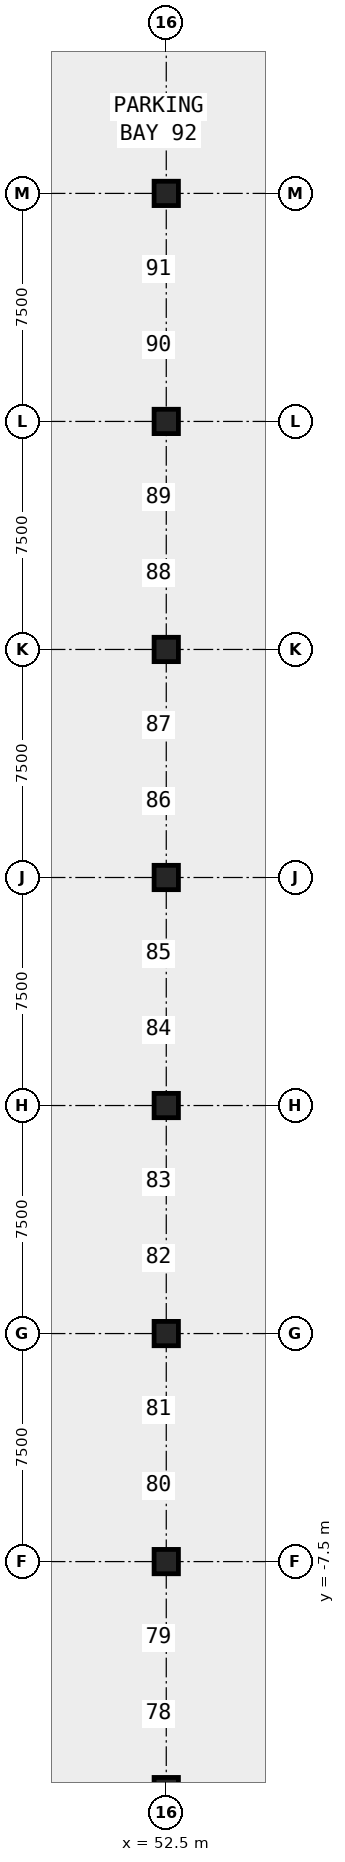
"""IFC4 building model, lengths in metres.
Left out: names, types, materials, properties, quantities, classifications, styles, units other than length and angle.
Written with IfcOpenShell. Run it as: python <this file> out.ifc"""

import sys

from ifc_helpers import new_model, si_unit, direction, frame, origin, origin_2d, place, context, subcontext, project, spatial, rectangle, extrude, element, save


model = new_model("IFC4")
c1 = context("Model", 3, precision=1e-05, world=origin(), true_north=direction((0.0, 1.0)))
c2 = subcontext(c1, "Body", "Model", "MODEL_VIEW")
j1 = project(units=[si_unit("LENGTHUNIT", "METRE"), si_unit("PLANEANGLEUNIT", "RADIAN")], contexts=[c1])
p1 = place(None, origin())
s1 = spatial("IfcSite", under=j1, at=p1, CompositionType="ELEMENT")
p2 = place(p1, origin())
s2 = spatial("IfcBuilding", under=s1, at=p2, CompositionType="ELEMENT")
p3 = place(p2, frame((0.0, 0.0, -5.5)))
s3 = spatial("IfcBuildingStorey", under=s2, at=p3, CompositionType="ELEMENT", Elevation=-5.5)
for number, where, z_axis, x_axis in (
    (1, (52.5, -15.0, -0.42), (0.0, 0.0, 1.0), (1.0, 0.0, 0.0)),
    (2, (52.5, -7.5, -0.42), (0.0, 0.0, 1.0), (1.0, 0.0, 0.0)),
    (3, (52.5, 0.0, -0.42), (0.0, 0.0, 1.0), (1.0, 0.0, 0.0)),
    (4, (52.5, 7.5, -0.42), (0.0, 0.0, 1.0), (1.0, 0.0, 0.0)),
    (5, (52.5, 15.0, -0.42), (0.0, 0.0, 1.0), (1.0, 0.0, 0.0)),
    (6, (52.5, 22.5, -0.42), (0.0, 0.0, 1.0), (1.0, 0.0, 0.0)),
    (7, (52.5, 30.0, -0.42), (0.0, 0.0, 1.0), (1.0, 0.0, 0.0)),
    (8, (52.5, 37.5, -0.42), (0.0, 0.0, 1.0), (1.0, 0.0, 0.0)),
):
    element("IfcColumn", number, at=place(p3, frame(where, z_axis=z_axis, x_axis=x_axis)), inside=s3, PredefinedType="COLUMN", context=c2, shape_type="SweptSolid", body=[
        extrude(rectangle(XDim=0.8, YDim=0.8, at=origin_2d()), origin(), (0.0, 0.0, 1.0), 5.72),
    ])
save(model, sys.argv[1])
